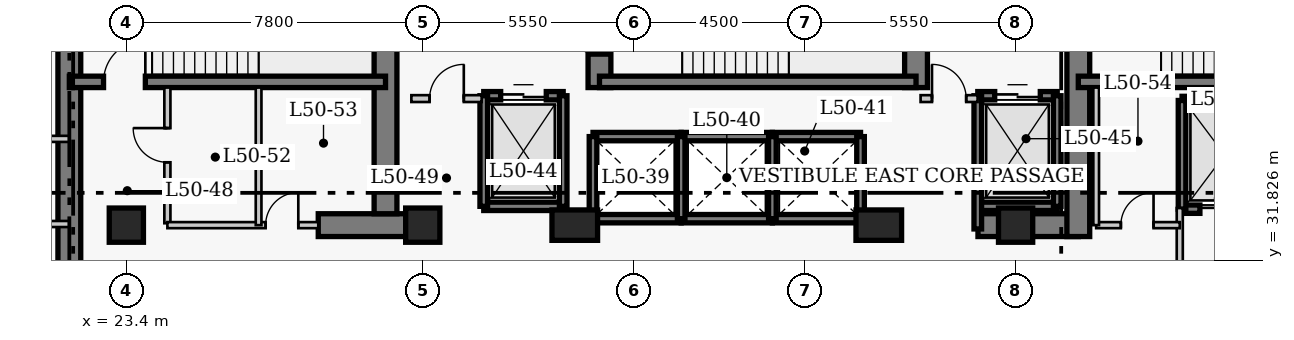
"""IFC4 building model, lengths in metres.
Left out: names, types, materials, properties, quantities, classifications, styles, units other than length and angle.
Written with IfcOpenShell. Run it as: python <this file> out.ifc"""

import sys

from ifc_helpers import new_model, si_unit, direction, frame, frame_2d, origin, origin_2d, place, context, subcontext, project, spatial, rectangle, extrude, element, fill, save


model = new_model("IFC4")
c1 = context("Model", 3, precision=1e-05, world=origin(), true_north=direction((0.0, 1.0)))
c2 = subcontext(c1, "Body", "Model", "MODEL_VIEW")
j1 = project(units=[si_unit("LENGTHUNIT", "METRE"), si_unit("PLANEANGLEUNIT", "RADIAN")], contexts=[c1])
p1 = place(None, origin())
s1 = spatial("IfcSite", under=j1, at=p1, CompositionType="ELEMENT")
p2 = place(p1, origin())
s2 = spatial("IfcBuilding", under=s1, at=p2, CompositionType="ELEMENT")
p3 = place(p2, frame((0.0, 0.0, 200.7)))
s3 = spatial("IfcBuildingStorey", under=s2, at=p3, CompositionType="ELEMENT", Elevation=200.7)
p4 = place(p3, frame((21.9, 27.05, 0.0), z_axis=(0.0, 0.0, 1.0), x_axis=(0.0, 1.0, 0.0)))
e1 = element("IfcWall", 1, at=p4, inside=s3, PredefinedType="SHEAR", context=c2, shape_type="SweptSolid", body=[
    extrude(rectangle(XDim=13.57, YDim=0.6, at=frame_2d((6.785, 0.0))), origin(), (0.0, 0.0, 1.0), 3.9),
])
p5 = place(p3, frame((28.45, 32.75, 0.0), z_axis=(0.0, 0.0, 1.0), x_axis=(1.0, 0.0, 0.0)))
e2 = element("IfcWall", 2, at=p5, inside=s3, PredefinedType="SHEAR", context=c2, shape_type="SweptSolid", body=[
    extrude(rectangle(XDim=2.4, YDim=0.6, at=frame_2d((1.2, 0.0))), origin(), (0.0, 0.0, 1.0), 3.9),
])
p6 = place(p3, frame((45.81, 32.75, 0.0), z_axis=(0.0, 0.0, 1.0), x_axis=(1.0, 0.0, 0.0)))
e3 = element("IfcWall", 3, at=p6, inside=s3, PredefinedType="SHEAR", context=c2, shape_type="SweptSolid", body=[
    extrude(rectangle(XDim=2.64, YDim=0.6, at=frame_2d((1.32, 0.0))), origin(), (0.0, 0.0, 1.0), 3.9),
])
p7 = place(p3, frame((30.22, 33.05, 0.0), z_axis=(0.0, 0.0, 1.0), x_axis=(0.0, 1.0, 0.0)))
e4 = element("IfcWall", 4, at=p7, inside=s3, PredefinedType="SHEAR", context=c2, shape_type="SweptSolid", body=[
    extrude(rectangle(XDim=7.27, YDim=0.6, at=frame_2d((3.635, 0.0))), origin(), (0.0, 0.0, 1.0), 3.9),
])
p8 = place(p3, frame((35.85, 36.37, 0.0), z_axis=(0.0, 0.0, 1.0), x_axis=(0.0, 1.0, 0.0)))
e5 = element("IfcWall", 5, at=p8, inside=s3, PredefinedType="SHEAR", context=c2, shape_type="SweptSolid", body=[
    extrude(rectangle(XDim=3.95, YDim=0.6, at=frame_2d((1.975, 0.0))), origin(), (0.0, 0.0, 1.0), 3.9),
])
p9 = place(p8, frame((0.88, 0.0, 0.0)))
e6 = element("IfcOpeningElement", 6, at=p9, cuts=e5, PredefinedType="OPENING", context=c2, shape_type="SweptSolid", body=[
    extrude(rectangle(XDim=1.1, YDim=2.15, at=frame_2d((0.55, 1.075))), frame((0.0, 0.31, 0.0), z_axis=(0.0, -1.0, 0.0), x_axis=(1.0, 0.0, 0.0)), (0.0, 0.0, 1.0), 0.62),
])
p10 = place(p3, frame((44.18, 36.37, 0.0), z_axis=(0.0, 0.0, 1.0), x_axis=(0.0, 1.0, 0.0)))
e7 = element("IfcWall", 7, at=p10, inside=s3, PredefinedType="SHEAR", context=c2, shape_type="SweptSolid", body=[
    extrude(rectangle(XDim=3.95, YDim=0.6, at=frame_2d((1.975, 0.0))), origin(), (0.0, 0.0, 1.0), 3.9),
])
p11 = place(p3, frame((48.45, 32.45, 0.0), z_axis=(0.0, 0.0, 1.0), x_axis=(0.0, 1.0, 0.0)))
e8 = element("IfcWall", 8, at=p11, inside=s3, PredefinedType="SHEAR", context=c2, shape_type="SweptSolid", body=[
    extrude(rectangle(XDim=7.87, YDim=0.6, at=frame_2d((3.935, 0.0))), origin(), (0.0, 0.0, 1.0), 3.9),
])
p12 = place(p11, frame((5.75, 0.0, 0.0)))
e9 = element("IfcOpeningElement", 9, at=p12, cuts=e8, PredefinedType="OPENING", context=c2, shape_type="SweptSolid", body=[
    extrude(rectangle(XDim=1.1, YDim=2.15, at=frame_2d((0.55, 1.075))), frame((0.0, 0.31, 0.0), z_axis=(0.0, -1.0, 0.0), x_axis=(1.0, 0.0, 0.0)), (0.0, 0.0, 1.0), 0.62),
])
p13 = place(p3, frame((21.9, 36.52, 0.0), z_axis=(0.0, 0.0, 1.0), x_axis=(1.0, 0.0, 0.0)))
e10 = element("IfcWall", 10, at=p13, inside=s3, PredefinedType="SHEAR", context=c2, shape_type="SweptSolid", body=[
    extrude(rectangle(XDim=8.32, YDim=0.3, at=frame_2d((4.16, 0.0))), origin(), (0.0, 0.0, 1.0), 3.9),
])
p14 = place(p13, frame((0.9, 0.0, 0.0)))
e11 = element("IfcOpeningElement", 11, at=p14, cuts=e10, PredefinedType="OPENING", context=c2, shape_type="SweptSolid", body=[
    extrude(rectangle(XDim=1.1, YDim=2.15, at=frame_2d((0.55, 1.075))), frame((0.0, 0.16, 0.0), z_axis=(0.0, -1.0, 0.0), x_axis=(1.0, 0.0, 0.0)), (0.0, 0.0, 1.0), 0.32),
])
p15 = place(p3, frame((35.85, 36.52, 0.0), z_axis=(0.0, 0.0, 1.0), x_axis=(1.0, 0.0, 0.0)))
e12 = element("IfcWall", 12, at=p15, inside=s3, PredefinedType="SHEAR", context=c2, shape_type="SweptSolid", body=[
    extrude(rectangle(XDim=8.33, YDim=0.3, at=frame_2d((4.165, 0.0))), origin(), (0.0, 0.0, 1.0), 3.9),
])
p16 = place(p3, frame((48.45, 36.52, 0.0), z_axis=(0.0, 0.0, 1.0), x_axis=(1.0, 0.0, 0.0)))
e13 = element("IfcWall", 13, at=p16, inside=s3, PredefinedType="SHEAR", context=c2, shape_type="SweptSolid", body=[
    extrude(rectangle(XDim=8.37, YDim=0.3, at=frame_2d((4.185, 0.0))), origin(), (0.0, 0.0, 1.0), 3.9),
])
for number, where, z_axis, x_axis in (
    (14, (23.4, 32.75, 0.0), (0.0, 0.0, 1.0), (1.0, 0.0, 0.0)),
    (15, (31.2, 32.75, 0.0), (0.0, 0.0, 1.0), (1.0, 0.0, 0.0)),
):
    element("IfcColumn", number, at=place(p3, frame(where, z_axis=z_axis, x_axis=x_axis)), inside=s3, PredefinedType="COLUMN", context=c2, shape_type="SweptSolid", body=[
        extrude(rectangle(XDim=0.9, YDim=0.9, at=origin_2d()), origin(), (0.0, 0.0, 1.0), 3.9),
    ])
for number, where, z_axis, x_axis in (
    (16, (35.2, 32.75, 0.0), (0.0, 0.0, 1.0), (1.0, 0.0, 0.0)),
    (17, (43.2, 32.75, 0.0), (0.0, 0.0, 1.0), (1.0, 0.0, 0.0)),
):
    element("IfcColumn", number, at=place(p3, frame(where, z_axis=z_axis, x_axis=x_axis)), inside=s3, PredefinedType="COLUMN", context=c2, shape_type="SweptSolid", body=[
        extrude(rectangle(XDim=1.2, YDim=0.8, at=origin_2d()), origin(), (0.0, 0.0, 1.0), 3.9),
    ])
p17 = place(p3, frame((46.8, 32.75, 0.0), z_axis=(0.0, 0.0, 1.0), x_axis=(1.0, 0.0, 0.0)))
e18 = element("IfcColumn", 18, at=p17, inside=s3, PredefinedType="COLUMN", context=c2, shape_type="SweptSolid", body=[
    extrude(rectangle(XDim=0.9, YDim=0.9, at=origin_2d()), origin(), (0.0, 0.0, 1.0), 3.9),
])
for number, where, z_axis, x_axis in (
    (19, (35.68, 35.08, 0.0), (0.0, 0.0, 1.0), (1.0, 0.0, 0.0)),
    (20, (35.68, 32.92, 0.0), (0.0, 0.0, 1.0), (1.0, 0.0, 0.0)),
):
    element("IfcWall", number, at=place(p3, frame(where, z_axis=z_axis, x_axis=x_axis)), inside=s3, PredefinedType="SHEAR", context=c2, shape_type="SweptSolid", body=[
        extrude(rectangle(XDim=2.32, YDim=0.22, at=frame_2d((1.16, 0.0))), origin(), (0.0, 0.0, 1.0), 3.9),
    ])
p18 = place(p3, frame((35.68, 32.92, 0.0), z_axis=(0.0, 0.0, 1.0), x_axis=(0.0, 1.0, 0.0)))
e21 = element("IfcWall", 21, at=p18, inside=s3, PredefinedType="SHEAR", context=c2, shape_type="SweptSolid", body=[
    extrude(rectangle(XDim=2.16, YDim=0.2, at=frame_2d((1.08, 0.0))), origin(), (0.0, 0.0, 1.0), 3.9),
])
for number, where, z_axis, x_axis in (
    (22, (38.0, 35.08, 0.0), (0.0, 0.0, 1.0), (1.0, 0.0, 0.0)),
    (23, (38.0, 32.92, 0.0), (0.0, 0.0, 1.0), (1.0, 0.0, 0.0)),
):
    element("IfcWall", number, at=place(p3, frame(where, z_axis=z_axis, x_axis=x_axis)), inside=s3, PredefinedType="SHEAR", context=c2, shape_type="SweptSolid", body=[
        extrude(rectangle(XDim=2.4, YDim=0.22, at=frame_2d((1.2, 0.0))), origin(), (0.0, 0.0, 1.0), 3.9),
    ])
p19 = place(p3, frame((38.0, 32.92, 0.0), z_axis=(0.0, 0.0, 1.0), x_axis=(0.0, 1.0, 0.0)))
e24 = element("IfcWall", 24, at=p19, inside=s3, PredefinedType="SHEAR", context=c2, shape_type="SweptSolid", body=[
    extrude(rectangle(XDim=2.16, YDim=0.2, at=frame_2d((1.08, 0.0))), origin(), (0.0, 0.0, 1.0), 3.9),
])
for number, where, z_axis, x_axis in (
    (25, (40.4, 35.08, 0.0), (0.0, 0.0, 1.0), (1.0, 0.0, 0.0)),
    (26, (40.4, 32.92, 0.0), (0.0, 0.0, 1.0), (1.0, 0.0, 0.0)),
):
    element("IfcWall", number, at=place(p3, frame(where, z_axis=z_axis, x_axis=x_axis)), inside=s3, PredefinedType="SHEAR", context=c2, shape_type="SweptSolid", body=[
        extrude(rectangle(XDim=2.32, YDim=0.22, at=frame_2d((1.16, 0.0))), origin(), (0.0, 0.0, 1.0), 3.9),
    ])
for number, where, z_axis, x_axis in (
    (27, (40.4, 32.92, 0.0), (0.0, 0.0, 1.0), (0.0, 1.0, 0.0)),
    (28, (42.72, 32.92, 0.0), (0.0, 0.0, 1.0), (0.0, 1.0, 0.0)),
):
    element("IfcWall", number, at=place(p3, frame(where, z_axis=z_axis, x_axis=x_axis)), inside=s3, PredefinedType="SHEAR", context=c2, shape_type="SweptSolid", body=[
        extrude(rectangle(XDim=2.16, YDim=0.2, at=frame_2d((1.08, 0.0))), origin(), (0.0, 0.0, 1.0), 3.9),
    ])
p20 = place(p3, frame((51.18, 36.03, 0.0), z_axis=(0.0, 0.0, 1.0), x_axis=(1.0, 0.0, 0.0)))
e29 = element("IfcWall", 29, at=p20, inside=s3, PredefinedType="SHEAR", context=c2, shape_type="SweptSolid", body=[
    extrude(rectangle(XDim=2.42, YDim=0.22, at=frame_2d((1.21, 0.0))), origin(), (0.0, 0.0, 1.0), 3.9),
])
p21 = place(p3, frame((51.18, 33.17, 0.0), z_axis=(0.0, 0.0, 1.0), x_axis=(1.0, 0.0, 0.0)))
e30 = element("IfcWall", 30, at=p21, inside=s3, PredefinedType="SHEAR", context=c2, shape_type="SweptSolid", body=[
    extrude(rectangle(XDim=2.42, YDim=0.22, at=frame_2d((1.21, 0.0))), origin(), (0.0, 0.0, 1.0), 3.9),
])
p22 = place(p21, frame((0.47, 0.0, 0.0)))
e31 = element("IfcOpeningElement", 31, at=p22, cuts=e30, PredefinedType="OPENING", context=c2, shape_type="SweptSolid", body=[
    extrude(rectangle(XDim=1.3, YDim=2.15, at=frame_2d((0.65, 1.075))), frame((0.0, 0.12, 0.0), z_axis=(0.0, -1.0, 0.0), x_axis=(1.0, 0.0, 0.0)), (0.0, 0.0, 1.0), 0.24),
])
p23 = place(p3, frame((51.18, 33.17, 0.0), z_axis=(0.0, 0.0, 1.0), x_axis=(0.0, 1.0, 0.0)))
e32 = element("IfcWall", 32, at=p23, inside=s3, PredefinedType="SHEAR", context=c2, shape_type="SweptSolid", body=[
    extrude(rectangle(XDim=2.86, YDim=0.2, at=frame_2d((1.43, 0.0))), origin(), (0.0, 0.0, 1.0), 3.9),
])
p24 = place(p3, frame((32.805, 36.155, 0.0), z_axis=(0.0, 0.0, 1.0), x_axis=(1.0, 0.0, 0.0)))
e33 = element("IfcWall", 33, at=p24, inside=s3, PredefinedType="SHEAR", context=c2, shape_type="SweptSolid", body=[
    extrude(rectangle(XDim=2.09, YDim=0.22, at=frame_2d((1.045, 0.0))), origin(), (0.0, 0.0, 1.0), 3.9),
])
p25 = place(p24, frame((0.445, 0.0, 0.0)))
e34 = element("IfcOpeningElement", 34, at=p25, cuts=e33, PredefinedType="OPENING", context=c2, shape_type="SweptSolid", body=[
    extrude(rectangle(XDim=1.2, YDim=2.15, at=frame_2d((0.6, 1.075))), frame((0.0, 0.12, 0.0), z_axis=(0.0, -1.0, 0.0), x_axis=(1.0, 0.0, 0.0)), (0.0, 0.0, 1.0), 0.24),
])
p26 = place(p3, frame((32.805, 33.245, 0.0), z_axis=(0.0, 0.0, 1.0), x_axis=(1.0, 0.0, 0.0)))
e35 = element("IfcWall", 35, at=p26, inside=s3, PredefinedType="SHEAR", context=c2, shape_type="SweptSolid", body=[
    extrude(rectangle(XDim=2.09, YDim=0.22, at=frame_2d((1.045, 0.0))), origin(), (0.0, 0.0, 1.0), 3.9),
])
for number, where, z_axis, x_axis in (
    (36, (32.805, 33.245, 0.0), (0.0, 0.0, 1.0), (0.0, 1.0, 0.0)),
    (37, (34.895, 33.245, 0.0), (0.0, 0.0, 1.0), (0.0, 1.0, 0.0)),
):
    element("IfcWall", number, at=place(p3, frame(where, z_axis=z_axis, x_axis=x_axis)), inside=s3, PredefinedType="SHEAR", context=c2, shape_type="SweptSolid", body=[
        extrude(rectangle(XDim=2.91, YDim=0.2, at=frame_2d((1.455, 0.0))), origin(), (0.0, 0.0, 1.0), 3.9),
    ])
p27 = place(p3, frame((45.805, 36.155, 0.0), z_axis=(0.0, 0.0, 1.0), x_axis=(1.0, 0.0, 0.0)))
e38 = element("IfcWall", 38, at=p27, inside=s3, PredefinedType="SHEAR", context=c2, shape_type="SweptSolid", body=[
    extrude(rectangle(XDim=2.09, YDim=0.22, at=frame_2d((1.045, 0.0))), origin(), (0.0, 0.0, 1.0), 3.9),
])
p28 = place(p27, frame((0.445, 0.0, 0.0)))
e39 = element("IfcOpeningElement", 39, at=p28, cuts=e38, PredefinedType="OPENING", context=c2, shape_type="SweptSolid", body=[
    extrude(rectangle(XDim=1.2, YDim=2.15, at=frame_2d((0.6, 1.075))), frame((0.0, 0.12, 0.0), z_axis=(0.0, -1.0, 0.0), x_axis=(1.0, 0.0, 0.0)), (0.0, 0.0, 1.0), 0.24),
])
p29 = place(p3, frame((45.805, 33.245, 0.0), z_axis=(0.0, 0.0, 1.0), x_axis=(1.0, 0.0, 0.0)))
e40 = element("IfcWall", 40, at=p29, inside=s3, PredefinedType="SHEAR", context=c2, shape_type="SweptSolid", body=[
    extrude(rectangle(XDim=2.09, YDim=0.22, at=frame_2d((1.045, 0.0))), origin(), (0.0, 0.0, 1.0), 3.9),
])
p30 = place(p3, frame((45.805, 32.65, 0.0), z_axis=(0.0, 0.0, 1.0), x_axis=(0.0, 1.0, 0.0)))
e41 = element("IfcWall", 41, at=p30, inside=s3, PredefinedType="SHEAR", context=c2, shape_type="SweptSolid", body=[
    extrude(rectangle(XDim=3.505, YDim=0.2, at=frame_2d((1.752, 0.0))), origin(), (0.0, 0.0, 1.0), 3.9),
])
p31 = place(p3, frame((47.895, 33.245, 0.0), z_axis=(0.0, 0.0, 1.0), x_axis=(0.0, 1.0, 0.0)))
e42 = element("IfcWall", 42, at=p31, inside=s3, PredefinedType="SHEAR", context=c2, shape_type="SweptSolid", body=[
    extrude(rectangle(XDim=2.91, YDim=0.2, at=frame_2d((1.455, 0.0))), origin(), (0.0, 0.0, 1.0), 3.9),
])
p32 = place(p3, frame((30.9, 36.08, 0.0), z_axis=(0.0, 0.0, 1.0), x_axis=(1.0, 0.0, 0.0)))
e43 = element("IfcWall", 43, at=p32, inside=s3, PredefinedType="PARTITIONING", context=c2, shape_type="SweptSolid", body=[
    extrude(rectangle(XDim=1.85, YDim=0.18, at=frame_2d((0.925, 0.0))), origin(), (0.0, 0.0, 1.0), 3.65),
])
p33 = place(p32, frame((0.48, 0.0, 0.0)))
e44 = element("IfcOpeningElement", 44, at=p33, cuts=e43, PredefinedType="OPENING", context=c2, shape_type="SweptSolid", body=[
    extrude(rectangle(XDim=0.9, YDim=2.15, at=frame_2d((0.45, 1.075))), frame((0.0, 0.1, 0.0), z_axis=(0.0, -1.0, 0.0), x_axis=(1.0, 0.0, 0.0)), (0.0, 0.0, 1.0), 0.2),
])
p34 = place(p3, frame((44.3, 36.08, 0.0), z_axis=(0.0, 0.0, 1.0), x_axis=(1.0, 0.0, 0.0)))
e45 = element("IfcWall", 45, at=p34, inside=s3, PredefinedType="PARTITIONING", context=c2, shape_type="SweptSolid", body=[
    extrude(rectangle(XDim=1.5, YDim=0.18, at=frame_2d((0.75, 0.0))), origin(), (0.0, 0.0, 1.0), 3.65),
])
p35 = place(p34, frame((0.3, 0.0, 0.0)))
e46 = element("IfcOpeningElement", 46, at=p35, cuts=e45, PredefinedType="OPENING", context=c2, shape_type="SweptSolid", body=[
    extrude(rectangle(XDim=0.9, YDim=2.15, at=frame_2d((0.45, 1.075))), frame((0.0, 0.1, 0.0), z_axis=(0.0, -1.0, 0.0), x_axis=(1.0, 0.0, 0.0)), (0.0, 0.0, 1.0), 0.2),
])
p36 = place(p3, frame((24.48, 32.8, 0.0), z_axis=(0.0, 0.0, 1.0), x_axis=(0.0, 1.0, 0.0)))
e47 = element("IfcWall", 47, at=p36, inside=s3, PredefinedType="PARTITIONING", context=c2, shape_type="SweptSolid", body=[
    extrude(rectangle(XDim=3.57, YDim=0.16, at=frame_2d((1.785, 0.0))), origin(), (0.0, 0.0, 1.0), 3.65),
])
p37 = place(p36, frame((1.604, 0.0, 0.0)))
e48 = element("IfcOpeningElement", 48, at=p37, cuts=e47, PredefinedType="OPENING", context=c2, shape_type="SweptSolid", body=[
    extrude(rectangle(XDim=0.9, YDim=2.1, at=frame_2d((0.45, 1.05))), frame((0.0, 0.09, 0.0), z_axis=(0.0, -1.0, 0.0), x_axis=(1.0, 0.0, 0.0)), (0.0, 0.0, 1.0), 0.18),
])
p38 = place(p3, frame((51.12, 29.5, 0.0), z_axis=(0.0, 0.0, 1.0), x_axis=(0.0, 1.0, 0.0)))
e49 = element("IfcWall", 49, at=p38, inside=s3, PredefinedType="PARTITIONING", context=c2, shape_type="SweptSolid", body=[
    extrude(rectangle(XDim=3.7, YDim=0.16, at=frame_2d((1.85, 0.0))), origin(), (0.0, 0.0, 1.0), 3.65),
])
p39 = place(p38, frame((0.9, 0.0, 0.0)))
e50 = element("IfcOpeningElement", 50, at=p39, cuts=e49, PredefinedType="OPENING", context=c2, shape_type="SweptSolid", body=[
    extrude(rectangle(XDim=1.1, YDim=2.15, at=frame_2d((0.55, 1.075))), frame((0.0, 0.09, 0.0), z_axis=(0.0, -1.0, 0.0), x_axis=(1.0, 0.0, 0.0)), (0.0, 0.0, 1.0), 0.18),
])
p40 = place(p3, frame((24.48, 32.75, 0.0), z_axis=(0.0, 0.0, 1.0), x_axis=(1.0, 0.0, 0.0)))
e51 = element("IfcWall", 51, at=p40, inside=s3, PredefinedType="PARTITIONING", context=c2, shape_type="SweptSolid", body=[
    extrude(rectangle(XDim=3.97, YDim=0.16, at=frame_2d((1.985, 0.0))), origin(), (0.0, 0.0, 1.0), 3.65),
])
p41 = place(p40, frame((2.585, 0.0, 0.0)))
e52 = element("IfcOpeningElement", 52, at=p41, cuts=e51, PredefinedType="OPENING", context=c2, shape_type="SweptSolid", body=[
    extrude(rectangle(XDim=0.86, YDim=2.05, at=frame_2d((0.43, 1.025))), frame((0.0, 0.09, 0.0), z_axis=(0.0, -1.0, 0.0), x_axis=(1.0, 0.0, 0.0)), (0.0, 0.0, 1.0), 0.18),
])
p42 = place(p3, frame((48.92, 32.75, 0.0), z_axis=(0.0, 0.0, 1.0), x_axis=(1.0, 0.0, 0.0)))
e53 = element("IfcWall", 53, at=p42, inside=s3, PredefinedType="PARTITIONING", context=c2, shape_type="SweptSolid", body=[
    extrude(rectangle(XDim=2.2, YDim=0.16, at=frame_2d((1.1, 0.0))), origin(), (0.0, 0.0, 1.0), 3.65),
])
p43 = place(p42, frame((0.65, 0.0, 0.0)))
e54 = element("IfcOpeningElement", 54, at=p43, cuts=e53, PredefinedType="OPENING", context=c2, shape_type="SweptSolid", body=[
    extrude(rectangle(XDim=0.86, YDim=2.05, at=frame_2d((0.43, 1.025))), frame((0.0, 0.09, 0.0), z_axis=(0.0, -1.0, 0.0), x_axis=(1.0, 0.0, 0.0)), (0.0, 0.0, 1.0), 0.18),
])
for number, where, z_axis, x_axis in (
    (55, (48.92, 32.75, 0.0), (0.0, 0.0, 1.0), (0.0, 1.0, 0.0)),
    (56, (26.88, 32.75, 0.0), (0.0, 0.0, 1.0), (0.0, 1.0, 0.0)),
):
    element("IfcWall", number, at=place(p3, frame(where, z_axis=z_axis, x_axis=x_axis)), inside=s3, PredefinedType="PARTITIONING", context=c2, shape_type="SweptSolid", body=[
        extrude(rectangle(XDim=3.62, YDim=0.15, at=frame_2d((1.81, 0.0))), origin(), (0.0, 0.0, 1.0), 3.65),
    ])
for number, where, z_axis, x_axis in (
    (57, (19.16, 35.02, 0.0), (0.0, 0.0, 1.0), (1.0, 0.0, 0.0)),
    (58, (19.16, 32.78, 0.0), (0.0, 0.0, 1.0), (1.0, 0.0, 0.0)),
):
    element("IfcWall", number, at=place(p3, frame(where, z_axis=z_axis, x_axis=x_axis)), inside=s3, PredefinedType="PARTITIONING", context=c2, shape_type="SweptSolid", body=[
        extrude(rectangle(XDim=2.74, YDim=0.16, at=frame_2d((1.37, 0.0))), origin(), (0.0, 0.0, 1.0), 3.65),
    ])
p44 = place(p22, origin())
e59 = element("IfcDoor", 59, at=p44, inside=s3, OperationType="DOUBLE_DOOR_SLIDING", PredefinedType="DOOR", context=c2, shape_type="SweptSolid", body=[
    extrude(rectangle(XDim=1.3, YDim=2.15, at=frame_2d((0.65, 1.075))), frame((0.0, 0.025, 0.0), z_axis=(0.0, -1.0, 0.0), x_axis=(1.0, 0.0, 0.0)), (0.0, 0.0, 1.0), 0.05),
])
fill(e31, e59)
p45 = place(p25, origin())
e60 = element("IfcDoor", 60, at=p45, inside=s3, OperationType="DOUBLE_DOOR_SLIDING", PredefinedType="DOOR", context=c2, shape_type="SweptSolid", body=[
    extrude(rectangle(XDim=1.2, YDim=2.15, at=frame_2d((0.6, 1.075))), frame((0.0, 0.025, 0.0), z_axis=(0.0, -1.0, 0.0), x_axis=(1.0, 0.0, 0.0)), (0.0, 0.0, 1.0), 0.05),
])
fill(e34, e60)
p46 = place(p28, origin())
e61 = element("IfcDoor", 61, at=p46, inside=s3, OperationType="DOUBLE_DOOR_SLIDING", PredefinedType="DOOR", context=c2, shape_type="SweptSolid", body=[
    extrude(rectangle(XDim=1.2, YDim=2.15, at=frame_2d((0.6, 1.075))), frame((0.0, 0.025, 0.0), z_axis=(0.0, -1.0, 0.0), x_axis=(1.0, 0.0, 0.0)), (0.0, 0.0, 1.0), 0.05),
])
fill(e39, e61)
p47 = place(p33, origin())
e62 = element("IfcDoor", 62, at=p47, inside=s3, OperationType="SINGLE_SWING_RIGHT", PredefinedType="DOOR", context=c2, shape_type="SweptSolid", body=[
    extrude(rectangle(XDim=0.9, YDim=2.15, at=frame_2d((0.45, 1.075))), frame((0.0, 0.025, 0.0), z_axis=(0.0, -1.0, 0.0), x_axis=(1.0, 0.0, 0.0)), (0.0, 0.0, 1.0), 0.05),
])
fill(e44, e62)
p48 = place(p35, origin())
e63 = element("IfcDoor", 63, at=p48, inside=s3, OperationType="SINGLE_SWING_LEFT", PredefinedType="DOOR", context=c2, shape_type="SweptSolid", body=[
    extrude(rectangle(XDim=0.9, YDim=2.15, at=frame_2d((0.45, 1.075))), frame((0.0, 0.025, 0.0), z_axis=(0.0, -1.0, 0.0), x_axis=(1.0, 0.0, 0.0)), (0.0, 0.0, 1.0), 0.05),
])
fill(e46, e63)
p49 = place(p37, origin())
e64 = element("IfcDoor", 64, at=p49, inside=s3, OperationType="SINGLE_SWING_RIGHT", PredefinedType="DOOR", context=c2, shape_type="SweptSolid", body=[
    extrude(rectangle(XDim=0.9, YDim=2.1, at=frame_2d((0.45, 1.05))), frame((0.0, 0.025, 0.0), z_axis=(0.0, -1.0, 0.0), x_axis=(1.0, 0.0, 0.0)), (0.0, 0.0, 1.0), 0.05),
])
fill(e48, e64)
p50 = place(p41, origin())
e65 = element("IfcDoor", 65, at=p50, inside=s3, OperationType="SINGLE_SWING_RIGHT", PredefinedType="DOOR", context=c2, shape_type="SweptSolid", body=[
    extrude(rectangle(XDim=0.86, YDim=2.05, at=frame_2d((0.43, 1.025))), frame((0.0, 0.025, 0.0), z_axis=(0.0, -1.0, 0.0), x_axis=(1.0, 0.0, 0.0)), (0.0, 0.0, 1.0), 0.05),
])
fill(e52, e65)
p51 = place(p43, origin())
e66 = element("IfcDoor", 66, at=p51, inside=s3, OperationType="SINGLE_SWING_RIGHT", PredefinedType="DOOR", context=c2, shape_type="SweptSolid", body=[
    extrude(rectangle(XDim=0.86, YDim=2.05, at=frame_2d((0.43, 1.025))), frame((0.0, 0.025, 0.0), z_axis=(0.0, -1.0, 0.0), x_axis=(1.0, 0.0, 0.0)), (0.0, 0.0, 1.0), 0.05),
])
fill(e54, e66)
p52 = place(p14, origin())
e67 = element("IfcDoor", 67, at=p52, inside=s3, OperationType="SINGLE_SWING_RIGHT", PredefinedType="DOOR", context=c2, shape_type="SweptSolid", body=[
    extrude(rectangle(XDim=1.1, YDim=2.15, at=frame_2d((0.55, 1.075))), frame((0.0, 0.025, 0.0), z_axis=(0.0, -1.0, 0.0), x_axis=(1.0, 0.0, 0.0)), (0.0, 0.0, 1.0), 0.05),
])
fill(e11, e67)
p53 = place(p9, origin())
e68 = element("IfcDoor", 68, at=p53, inside=s3, OperationType="SINGLE_SWING_RIGHT", PredefinedType="DOOR", context=c2, shape_type="SweptSolid", body=[
    extrude(rectangle(XDim=1.1, YDim=2.15, at=frame_2d((0.55, 1.075))), frame((0.0, 0.025, 0.0), z_axis=(0.0, -1.0, 0.0), x_axis=(1.0, 0.0, 0.0)), (0.0, 0.0, 1.0), 0.05),
])
fill(e6, e68)
save(model, sys.argv[1])
